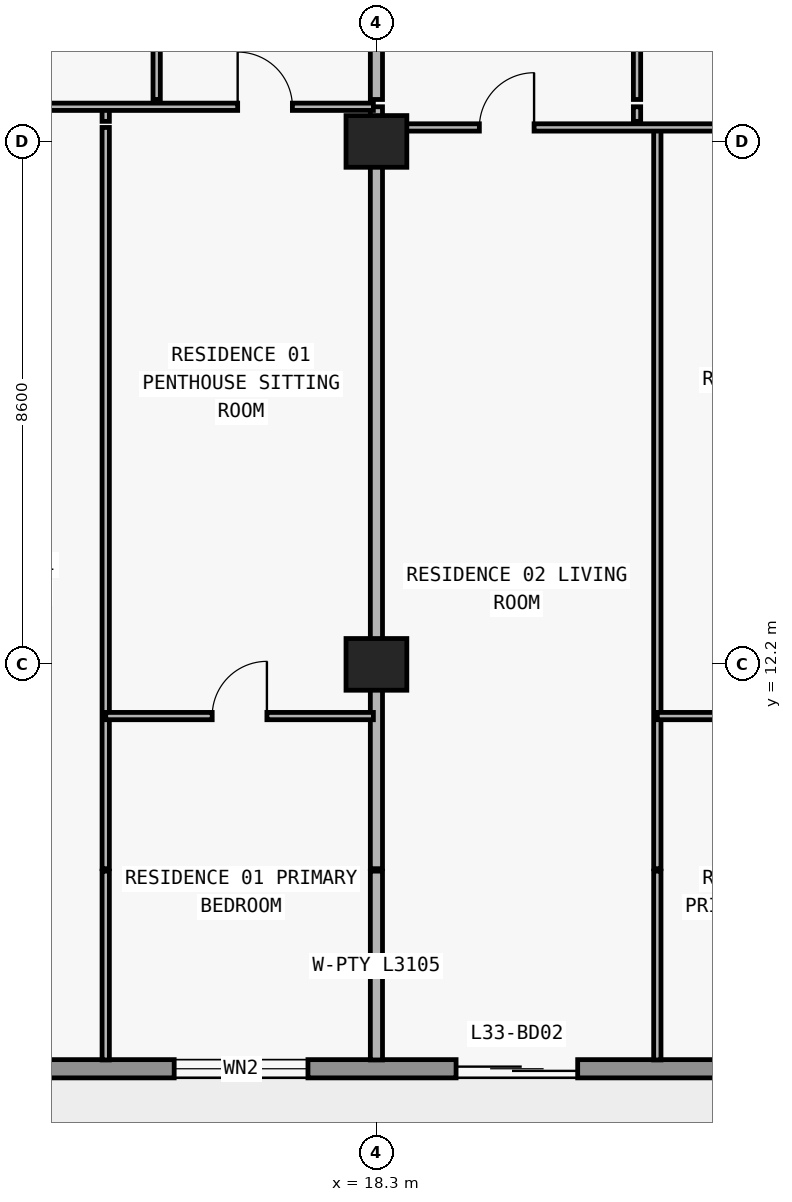
"""IFC4 building model, lengths in metres.
Left out: names, types, materials, properties, quantities, classifications, styles, units other than length and angle.
Written with IfcOpenShell. Run it as: python <this file> out.ifc"""

import sys

from ifc_helpers import new_model, si_unit, direction, frame, frame_2d, origin, origin_2d, place, context, subcontext, project, spatial, rectangle, extrude, element, fill, save


model = new_model("IFC4")
c1 = context("Model", 3, precision=1e-05, world=origin(), true_north=direction((0.0, 1.0)))
c2 = subcontext(c1, "Body", "Model", "MODEL_VIEW")
j1 = project(units=[si_unit("LENGTHUNIT", "METRE"), si_unit("PLANEANGLEUNIT", "RADIAN")], contexts=[c1])
p1 = place(None, origin())
s1 = spatial("IfcSite", under=j1, at=p1, CompositionType="ELEMENT")
p2 = place(p1, origin())
s2 = spatial("IfcBuilding", under=s1, at=p2, CompositionType="ELEMENT")
p3 = place(p2, frame((0.0, 0.0, 122.4)))
s3 = spatial("IfcBuildingStorey", under=s2, at=p3, CompositionType="ELEMENT", Elevation=122.4)
for number, where, z_axis, x_axis in (
    (1, (18.3, 12.2, 0.0), (0.0, 0.0, 1.0), (1.0, 0.0, 0.0)),
    (2, (18.3, 20.8, 0.0), (0.0, 0.0, 1.0), (1.0, 0.0, 0.0)),
):
    element("IfcColumn", number, at=place(p3, frame(where, z_axis=z_axis, x_axis=x_axis)), inside=s3, PredefinedType="COLUMN", context=c2, shape_type="SweptSolid", body=[
        extrude(rectangle(XDim=1.0, YDim=0.85, at=origin_2d()), origin(), (0.0, 0.0, 1.0), 3.05),
    ])
p4 = place(p3, frame((70.1, 5.55, 0.0), z_axis=(0.0, 0.0, 1.0), x_axis=(-1.0, 0.0, 0.0)))
e3 = element("IfcWall", 3, at=p4, inside=s3, PredefinedType="STANDARD", context=c2, shape_type="SweptSolid", body=[
    extrude(rectangle(XDim=62.4, YDim=0.3, at=frame_2d((31.2, 0.0))), origin(), (0.0, 0.0, 1.0), 3.05),
])
p5 = place(p4, frame((57.226, 0.0, 0.0)))
e4 = element("IfcOpeningElement", 4, at=p5, cuts=e3, PredefinedType="OPENING", context=c2, shape_type="SweptSolid", body=[
    extrude(rectangle(XDim=2.0, YDim=2.3, at=frame_2d((1.0, 1.15))), frame((0.0, 0.16, 0.0), z_axis=(0.0, -1.0, 0.0), x_axis=(1.0, 0.0, 0.0)), (0.0, 0.0, 1.0), 0.32),
])
p6 = place(p4, frame((52.926, 0.0, 0.85)))
e5 = element("IfcOpeningElement", 5, at=p6, cuts=e3, PredefinedType="OPENING", context=c2, shape_type="SweptSolid", body=[
    extrude(rectangle(XDim=2.2, YDim=1.55, at=frame_2d((1.1, 0.775))), frame((0.0, 0.16, 0.0), z_axis=(0.0, -1.0, 0.0), x_axis=(1.0, 0.0, 0.0)), (0.0, 0.0, 1.0), 0.32),
])
p7 = place(p4, frame((48.49, 0.0, 0.0)))
e6 = element("IfcOpeningElement", 6, at=p7, cuts=e3, PredefinedType="OPENING", context=c2, shape_type="SweptSolid", body=[
    extrude(rectangle(XDim=2.0, YDim=2.3, at=frame_2d((1.0, 1.15))), frame((0.0, 0.16, 0.0), z_axis=(0.0, -1.0, 0.0), x_axis=(1.0, 0.0, 0.0)), (0.0, 0.0, 1.0), 0.32),
])
p8 = place(p4, frame((44.39, 0.0, 0.85)))
e7 = element("IfcOpeningElement", 7, at=p8, cuts=e3, PredefinedType="OPENING", context=c2, shape_type="SweptSolid", body=[
    extrude(rectangle(XDim=1.8, YDim=1.55, at=frame_2d((0.9, 0.775))), frame((0.0, 0.16, 0.0), z_axis=(0.0, -1.0, 0.0), x_axis=(1.0, 0.0, 0.0)), (0.0, 0.0, 1.0), 0.32),
])
p9 = place(p4, frame((40.426, 0.0, 0.0)))
e8 = element("IfcOpeningElement", 8, at=p9, cuts=e3, PredefinedType="OPENING", context=c2, shape_type="SweptSolid", body=[
    extrude(rectangle(XDim=2.0, YDim=2.3, at=frame_2d((1.0, 1.15))), frame((0.0, 0.16, 0.0), z_axis=(0.0, -1.0, 0.0), x_axis=(1.0, 0.0, 0.0)), (0.0, 0.0, 1.0), 0.32),
])
p10 = place(p4, frame((36.126, 0.0, 0.85)))
e9 = element("IfcOpeningElement", 9, at=p10, cuts=e3, PredefinedType="OPENING", context=c2, shape_type="SweptSolid", body=[
    extrude(rectangle(XDim=2.2, YDim=1.55, at=frame_2d((1.1, 0.775))), frame((0.0, 0.16, 0.0), z_axis=(0.0, -1.0, 0.0), x_axis=(1.0, 0.0, 0.0)), (0.0, 0.0, 1.0), 0.32),
])
p11 = place(p4, frame((31.91, 0.0, 0.0)))
e10 = element("IfcOpeningElement", 10, at=p11, cuts=e3, PredefinedType="OPENING", context=c2, shape_type="SweptSolid", body=[
    extrude(rectangle(XDim=2.0, YDim=2.3, at=frame_2d((1.0, 1.15))), frame((0.0, 0.16, 0.0), z_axis=(0.0, -1.0, 0.0), x_axis=(1.0, 0.0, 0.0)), (0.0, 0.0, 1.0), 0.32),
])
p12 = place(p4, frame((28.21, 0.0, 0.85)))
e11 = element("IfcOpeningElement", 11, at=p12, cuts=e3, PredefinedType="OPENING", context=c2, shape_type="SweptSolid", body=[
    extrude(rectangle(XDim=1.8, YDim=1.55, at=frame_2d((0.9, 0.775))), frame((0.0, 0.16, 0.0), z_axis=(0.0, -1.0, 0.0), x_axis=(1.0, 0.0, 0.0)), (0.0, 0.0, 1.0), 0.32),
])
p13 = place(p4, frame((24.426, 0.0, 0.0)))
e12 = element("IfcOpeningElement", 12, at=p13, cuts=e3, PredefinedType="OPENING", context=c2, shape_type="SweptSolid", body=[
    extrude(rectangle(XDim=2.0, YDim=2.3, at=frame_2d((1.0, 1.15))), frame((0.0, 0.16, 0.0), z_axis=(0.0, -1.0, 0.0), x_axis=(1.0, 0.0, 0.0)), (0.0, 0.0, 1.0), 0.32),
])
p14 = place(p4, frame((20.126, 0.0, 0.85)))
e13 = element("IfcOpeningElement", 13, at=p14, cuts=e3, PredefinedType="OPENING", context=c2, shape_type="SweptSolid", body=[
    extrude(rectangle(XDim=2.2, YDim=1.55, at=frame_2d((1.1, 0.775))), frame((0.0, 0.16, 0.0), z_axis=(0.0, -1.0, 0.0), x_axis=(1.0, 0.0, 0.0)), (0.0, 0.0, 1.0), 0.32),
])
p15 = place(p4, frame((15.69, 0.0, 0.0)))
e14 = element("IfcOpeningElement", 14, at=p15, cuts=e3, PredefinedType="OPENING", context=c2, shape_type="SweptSolid", body=[
    extrude(rectangle(XDim=2.0, YDim=2.3, at=frame_2d((1.0, 1.15))), frame((0.0, 0.16, 0.0), z_axis=(0.0, -1.0, 0.0), x_axis=(1.0, 0.0, 0.0)), (0.0, 0.0, 1.0), 0.32),
])
p16 = place(p4, frame((11.59, 0.0, 0.85)))
e15 = element("IfcOpeningElement", 15, at=p16, cuts=e3, PredefinedType="OPENING", context=c2, shape_type="SweptSolid", body=[
    extrude(rectangle(XDim=1.8, YDim=1.55, at=frame_2d((0.9, 0.775))), frame((0.0, 0.16, 0.0), z_axis=(0.0, -1.0, 0.0), x_axis=(1.0, 0.0, 0.0)), (0.0, 0.0, 1.0), 0.32),
])
p17 = place(p4, frame((7.626, 0.0, 0.0)))
e16 = element("IfcOpeningElement", 16, at=p17, cuts=e3, PredefinedType="OPENING", context=c2, shape_type="SweptSolid", body=[
    extrude(rectangle(XDim=2.0, YDim=2.3, at=frame_2d((1.0, 1.15))), frame((0.0, 0.16, 0.0), z_axis=(0.0, -1.0, 0.0), x_axis=(1.0, 0.0, 0.0)), (0.0, 0.0, 1.0), 0.32),
])
p18 = place(p4, frame((3.326, 0.0, 0.85)))
e17 = element("IfcOpeningElement", 17, at=p18, cuts=e3, PredefinedType="OPENING", context=c2, shape_type="SweptSolid", body=[
    extrude(rectangle(XDim=2.2, YDim=1.55, at=frame_2d((1.1, 0.775))), frame((0.0, 0.16, 0.0), z_axis=(0.0, -1.0, 0.0), x_axis=(1.0, 0.0, 0.0)), (0.0, 0.0, 1.0), 0.32),
])
p19 = place(p3, frame((13.848, 5.695, 0.0), z_axis=(0.0, 0.0, 1.0), x_axis=(0.0, 1.0, 0.0)))
e18 = element("IfcWall", 18, at=p19, inside=s3, PredefinedType="PARTITIONING", context=c2, shape_type="SweptSolid", body=[
    extrude(rectangle(XDim=3.105, YDim=0.12, at=frame_2d((1.552, 0.0))), origin(), (0.0, 0.0, 1.0), 3.05),
])
p20 = place(p3, frame((13.848, 8.84, 0.0), z_axis=(0.0, 0.0, 1.0), x_axis=(0.0, 1.0, 0.0)))
e19 = element("IfcWall", 19, at=p20, inside=s3, PredefinedType="PARTITIONING", context=c2, shape_type="SweptSolid", body=[
    extrude(rectangle(XDim=12.19, YDim=0.12, at=frame_2d((6.095, 0.0))), origin(), (0.0, 0.0, 1.0), 3.05),
])
p21 = place(p3, frame((13.848, 21.13, 0.0), z_axis=(0.0, 0.0, 1.0), x_axis=(0.0, 1.0, 0.0)))
e20 = element("IfcWall", 20, at=p21, inside=s3, PredefinedType="PARTITIONING", context=c2, shape_type="SweptSolid", body=[
    extrude(rectangle(XDim=0.24, YDim=0.12, at=frame_2d((0.12, 0.0))), origin(), (0.0, 0.0, 1.0), 3.05),
])
p22 = place(p3, frame((14.686, 21.49, 0.0), z_axis=(0.0, 0.0, 1.0), x_axis=(0.0, 1.0, 0.0)))
e21 = element("IfcWall", 21, at=p22, inside=s3, PredefinedType="PARTITIONING", context=c2, shape_type="SweptSolid", body=[
    extrude(rectangle(XDim=4.69, YDim=0.12, at=frame_2d((2.345, 0.0))), origin(), (0.0, 0.0, 1.0), 3.05),
])
p23 = place(p22, frame((1.895, 0.0, 0.0)))
e22 = element("IfcOpeningElement", 22, at=p23, cuts=e21, PredefinedType="OPENING", context=c2, shape_type="SweptSolid", body=[
    extrude(rectangle(XDim=0.9, YDim=2.15, at=frame_2d((0.45, 1.075))), frame((0.0, 0.07, 0.0), z_axis=(0.0, -1.0, 0.0), x_axis=(1.0, 0.0, 0.0)), (0.0, 0.0, 1.0), 0.14),
])
p24 = place(p3, frame((18.3, 5.695, 0.0), z_axis=(0.0, 0.0, 1.0), x_axis=(0.0, 1.0, 0.0)))
e23 = element("IfcWall", 23, at=p24, inside=s3, PredefinedType="PARTITIONING", context=c2, shape_type="SweptSolid", body=[
    extrude(rectangle(XDim=3.105, YDim=0.2, at=frame_2d((1.552, 0.0))), origin(), (0.0, 0.0, 1.0), 3.05),
])
p25 = place(p3, frame((18.3, 8.84, 0.0), z_axis=(0.0, 0.0, 1.0), x_axis=(0.0, 1.0, 0.0)))
e24 = element("IfcWall", 24, at=p25, inside=s3, PredefinedType="PARTITIONING", context=c2, shape_type="SweptSolid", body=[
    extrude(rectangle(XDim=12.19, YDim=0.2, at=frame_2d((6.095, 0.0))), origin(), (0.0, 0.0, 1.0), 2.174),
])
p26 = place(p3, frame((18.3, 21.13, 0.0), z_axis=(0.0, 0.0, 1.0), x_axis=(0.0, 1.0, 0.0)))
e25 = element("IfcWall", 25, at=p26, inside=s3, PredefinedType="PARTITIONING", context=c2, shape_type="SweptSolid", body=[
    extrude(rectangle(XDim=0.24, YDim=0.2, at=frame_2d((0.12, 0.0))), origin(), (0.0, 0.0, 1.0), 2.174),
])
p27 = place(p3, frame((18.3, 21.49, 0.0), z_axis=(0.0, 0.0, 1.0), x_axis=(0.0, 1.0, 0.0)))
e26 = element("IfcWall", 26, at=p27, inside=s3, PredefinedType="PARTITIONING", context=c2, shape_type="SweptSolid", body=[
    extrude(rectangle(XDim=4.69, YDim=0.2, at=frame_2d((2.345, 0.0))), origin(), (0.0, 0.0, 1.0), 2.174),
])
p28 = place(p3, frame((22.586, 21.13, 0.0), z_axis=(0.0, 0.0, 1.0), x_axis=(0.0, 1.0, 0.0)))
e27 = element("IfcWall", 27, at=p28, inside=s3, PredefinedType="PARTITIONING", context=c2, shape_type="SweptSolid", body=[
    extrude(rectangle(XDim=0.24, YDim=0.12, at=frame_2d((0.12, 0.0))), origin(), (0.0, 0.0, 1.0), 2.486),
])
p29 = place(p3, frame((22.586, 21.49, 0.0), z_axis=(0.0, 0.0, 1.0), x_axis=(0.0, 1.0, 0.0)))
e28 = element("IfcWall", 28, at=p29, inside=s3, PredefinedType="PARTITIONING", context=c2, shape_type="SweptSolid", body=[
    extrude(rectangle(XDim=4.69, YDim=0.12, at=frame_2d((2.345, 0.0))), origin(), (0.0, 0.0, 1.0), 2.486),
])
p30 = place(p29, frame((1.895, 0.0, 0.0)))
e29 = element("IfcOpeningElement", 29, at=p30, cuts=e28, PredefinedType="OPENING", context=c2, shape_type="SweptSolid", body=[
    extrude(rectangle(XDim=0.9, YDim=2.15, at=frame_2d((0.45, 1.075))), frame((0.0, 0.07, 0.0), z_axis=(0.0, -1.0, 0.0), x_axis=(1.0, 0.0, 0.0)), (0.0, 0.0, 1.0), 0.14),
])
p31 = place(p3, frame((22.92, 5.695, 0.0), z_axis=(0.0, 0.0, 1.0), x_axis=(0.0, 1.0, 0.0)))
e30 = element("IfcWall", 30, at=p31, inside=s3, PredefinedType="PARTITIONING", context=c2, shape_type="SweptSolid", body=[
    extrude(rectangle(XDim=3.105, YDim=0.12, at=frame_2d((1.552, 0.0))), origin(), (0.0, 0.0, 1.0), 3.05),
])
p32 = place(p3, frame((22.92, 8.84, 0.0), z_axis=(0.0, 0.0, 1.0), x_axis=(0.0, 1.0, 0.0)))
e31 = element("IfcWall", 31, at=p32, inside=s3, PredefinedType="PARTITIONING", context=c2, shape_type="SweptSolid", body=[
    extrude(rectangle(XDim=12.19, YDim=0.12, at=frame_2d((6.095, 0.0))), origin(), (0.0, 0.0, 1.0), 3.05),
])
p33 = place(p3, frame((13.848, 11.35, 0.0), z_axis=(0.0, 0.0, 1.0), x_axis=(1.0, 0.0, 0.0)))
e32 = element("IfcWall", 32, at=p33, inside=s3, PredefinedType="PARTITIONING", context=c2, shape_type="SweptSolid", body=[
    extrude(rectangle(XDim=4.402, YDim=0.12, at=frame_2d((2.201, 0.0))), origin(), (0.0, 0.0, 1.0), 3.05),
])
p34 = place(p33, frame((1.751, 0.0, 0.0)))
e33 = element("IfcOpeningElement", 33, at=p34, cuts=e32, PredefinedType="OPENING", context=c2, shape_type="SweptSolid", body=[
    extrude(rectangle(XDim=0.9, YDim=2.15, at=frame_2d((0.45, 1.075))), frame((0.0, 0.07, 0.0), z_axis=(0.0, -1.0, 0.0), x_axis=(1.0, 0.0, 0.0)), (0.0, 0.0, 1.0), 0.14),
])
p35 = place(p3, frame((22.92, 11.35, 0.0), z_axis=(0.0, 0.0, 1.0), x_axis=(1.0, 0.0, 0.0)))
e34 = element("IfcWall", 34, at=p35, inside=s3, PredefinedType="PARTITIONING", context=c2, shape_type="SweptSolid", body=[
    extrude(rectangle(XDim=3.78, YDim=0.12, at=frame_2d((1.89, 0.0))), origin(), (0.0, 0.0, 1.0), 3.05),
])
p36 = place(p35, frame((1.44, 0.0, 0.0)))
e35 = element("IfcOpeningElement", 35, at=p36, cuts=e34, PredefinedType="OPENING", context=c2, shape_type="SweptSolid", body=[
    extrude(rectangle(XDim=0.9, YDim=2.15, at=frame_2d((0.45, 1.075))), frame((0.0, 0.07, 0.0), z_axis=(0.0, -1.0, 0.0), x_axis=(1.0, 0.0, 0.0)), (0.0, 0.0, 1.0), 0.14),
])
p37 = place(p3, frame((18.3, 21.03, 0.0), z_axis=(0.0, 0.0, 1.0), x_axis=(1.0, 0.0, 0.0)))
e36 = element("IfcWall", 36, at=p37, inside=s3, PredefinedType="PARTITIONING", context=c2, shape_type="SweptSolid", body=[
    extrude(rectangle(XDim=8.18, YDim=0.12, at=frame_2d((4.09, 0.0))), origin(), (0.0, 0.0, 1.0), 2.174),
])
p38 = place(p37, frame((1.693, 0.0, 0.0)))
e37 = element("IfcOpeningElement", 37, at=p38, cuts=e36, PredefinedType="OPENING", context=c2, shape_type="SweptSolid", body=[
    extrude(rectangle(XDim=0.9, YDim=2.124, at=frame_2d((0.45, 1.062))), frame((0.0, 0.07, 0.0), z_axis=(0.0, -1.0, 0.0), x_axis=(1.0, 0.0, 0.0)), (0.0, 0.0, 1.0), 0.14),
])
p39 = place(p37, frame((5.95, 0.0, 0.0)))
e38 = element("IfcOpeningElement", 38, at=p39, cuts=e36, PredefinedType="OPENING", context=c2, shape_type="SweptSolid", body=[
    extrude(rectangle(XDim=0.9, YDim=2.124, at=frame_2d((0.45, 1.062))), frame((0.0, 0.07, 0.0), z_axis=(0.0, -1.0, 0.0), x_axis=(1.0, 0.0, 0.0)), (0.0, 0.0, 1.0), 0.14),
])
p40 = place(p3, frame((9.9, 21.37, 0.0), z_axis=(0.0, 0.0, 1.0), x_axis=(1.0, 0.0, 0.0)))
e39 = element("IfcWall", 39, at=p40, inside=s3, PredefinedType="PARTITIONING", context=c2, shape_type="SweptSolid", body=[
    extrude(rectangle(XDim=8.35, YDim=0.12, at=frame_2d((4.175, 0.0))), origin(), (0.0, 0.0, 1.0), 3.05),
])
p41 = place(p40, frame((1.524, 0.0, 0.0)))
e40 = element("IfcOpeningElement", 40, at=p41, cuts=e39, PredefinedType="OPENING", context=c2, shape_type="SweptSolid", body=[
    extrude(rectangle(XDim=0.9, YDim=2.15, at=frame_2d((0.45, 1.075))), frame((0.0, 0.07, 0.0), z_axis=(0.0, -1.0, 0.0), x_axis=(1.0, 0.0, 0.0)), (0.0, 0.0, 1.0), 0.14),
])
p42 = place(p40, frame((6.118, 0.0, 0.0)))
e41 = element("IfcOpeningElement", 41, at=p42, cuts=e39, PredefinedType="OPENING", context=c2, shape_type="SweptSolid", body=[
    extrude(rectangle(XDim=0.9, YDim=2.15, at=frame_2d((0.45, 1.075))), frame((0.0, 0.07, 0.0), z_axis=(0.0, -1.0, 0.0), x_axis=(1.0, 0.0, 0.0)), (0.0, 0.0, 1.0), 0.14),
])
p43 = place(p6, origin())
e42 = element("IfcWindow", 42, at=p43, inside=s3, PartitioningType="SINGLE_PANEL", PredefinedType="WINDOW", context=c2, shape_type="SweptSolid", body=[
    extrude(rectangle(XDim=2.2, YDim=1.55, at=frame_2d((1.1, 0.775))), frame((0.0, 0.03, 0.0), z_axis=(0.0, -1.0, 0.0), x_axis=(1.0, 0.0, 0.0)), (0.0, 0.0, 1.0), 0.06),
])
fill(e5, e42)
p44 = place(p7, origin())
e43 = element("IfcDoor", 43, at=p44, inside=s3, OperationType="DOUBLE_DOOR_SLIDING", PredefinedType="DOOR", context=c2, shape_type="SweptSolid", body=[
    extrude(rectangle(XDim=2.0, YDim=2.3, at=frame_2d((1.0, 1.15))), frame((0.0, 0.025, 0.0), z_axis=(0.0, -1.0, 0.0), x_axis=(1.0, 0.0, 0.0)), (0.0, 0.0, 1.0), 0.05),
])
fill(e6, e43)
p45 = place(p42, origin())
e44 = element("IfcDoor", 44, at=p45, inside=s3, OperationType="SINGLE_SWING_LEFT", PredefinedType="DOOR", context=c2, shape_type="SweptSolid", body=[
    extrude(rectangle(XDim=0.9, YDim=2.15, at=frame_2d((0.45, 1.075))), frame((0.0, 0.025, 0.0), z_axis=(0.0, -1.0, 0.0), x_axis=(1.0, 0.0, 0.0)), (0.0, 0.0, 1.0), 0.05),
])
fill(e41, e44)
p46 = place(p34, origin())
e45 = element("IfcDoor", 45, at=p46, inside=s3, OperationType="SINGLE_SWING_RIGHT", PredefinedType="DOOR", context=c2, shape_type="SweptSolid", body=[
    extrude(rectangle(XDim=0.9, YDim=2.15, at=frame_2d((0.45, 1.075))), frame((0.0, 0.025, 0.0), z_axis=(0.0, -1.0, 0.0), x_axis=(1.0, 0.0, 0.0)), (0.0, 0.0, 1.0), 0.05),
])
fill(e33, e45)
p47 = place(p38, origin())
e46 = element("IfcDoor", 46, at=p47, inside=s3, OperationType="SINGLE_SWING_RIGHT", PredefinedType="DOOR", context=c2, shape_type="SweptSolid", body=[
    extrude(rectangle(XDim=0.9, YDim=2.124, at=frame_2d((0.45, 1.062))), frame((0.0, 0.025, 0.0), z_axis=(0.0, -1.0, 0.0), x_axis=(1.0, 0.0, 0.0)), (0.0, 0.0, 1.0), 0.05),
])
fill(e37, e46)
save(model, sys.argv[1])
